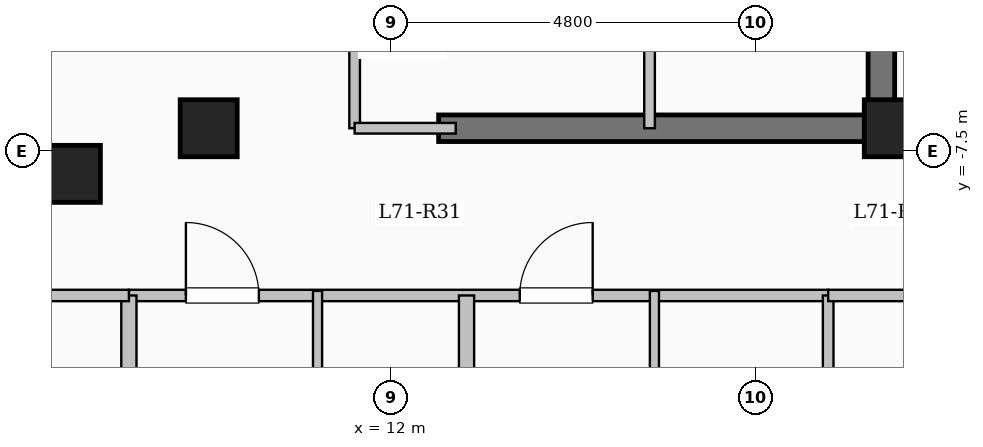
"""IFC4 building model, lengths in metres.
Left out: names, types, materials, properties, quantities, classifications, styles, units other than length and angle.
Written with IfcOpenShell. Run it as: python <this file> out.ifc"""

import sys

from ifc_helpers import new_model, si_unit, direction, frame, frame_2d, origin, origin_2d, place, context, subcontext, project, spatial, rectangle, extrude, element, fill, save


model = new_model("IFC4")
c1 = context("Model", 3, precision=1e-05, world=origin(), true_north=direction((0.0, 1.0)))
c2 = subcontext(c1, "Body", "Model", "MODEL_VIEW")
j1 = project(units=[si_unit("LENGTHUNIT", "METRE"), si_unit("PLANEANGLEUNIT", "RADIAN")], contexts=[c1])
p1 = place(None, origin())
s1 = spatial("IfcSite", under=j1, at=p1, CompositionType="ELEMENT")
p2 = place(p1, origin())
s2 = spatial("IfcBuilding", under=s1, at=p2, CompositionType="ELEMENT")
p3 = place(p2, frame((0.0, 0.0, 261.6)))
s3 = spatial("IfcBuildingStorey", under=s2, at=p3, CompositionType="ELEMENT", Elevation=261.6)
for number, where, z_axis, x_axis in (
    (1, (7.8, -7.8, 0.0), (0.0, 0.0, 1.0), (1.0, 0.0, 0.0)),
    (2, (9.6, -7.2, 0.0), (0.0, 0.0, 1.0), (1.0, 0.0, 0.0)),
    (3, (18.6, -7.2, 0.0), (0.0, 0.0, 1.0), (1.0, 0.0, 0.0)),
):
    element("IfcColumn", number, at=place(p3, frame(where, z_axis=z_axis, x_axis=x_axis)), inside=s3, PredefinedType="COLUMN", context=c2, shape_type="SweptSolid", body=[
        extrude(rectangle(XDim=0.75, YDim=0.75, at=origin_2d()), origin(), (0.0, 0.0, 1.0), 3.35),
    ])
p4 = place(p3, frame((18.45, -7.375, 0.0), z_axis=(0.0, 0.0, 1.0), x_axis=(0.0, 1.0, 0.0)))
e4 = element("IfcWall", 4, at=p4, inside=s3, PredefinedType="SHEAR", context=c2, shape_type="SweptSolid", body=[
    extrude(rectangle(XDim=14.05, YDim=0.35, at=frame_2d((7.025, 0.0))), origin(), (0.0, 0.0, 1.0), 3.35),
])
p5 = place(p3, frame((12.625, -7.2, 0.0), z_axis=(0.0, 0.0, 1.0), x_axis=(1.0, 0.0, 0.0)))
e5 = element("IfcWall", 5, at=p5, inside=s3, PredefinedType="SHEAR", context=c2, shape_type="SweptSolid", body=[
    extrude(rectangle(XDim=6.0, YDim=0.35, at=frame_2d((3.0, 0.0))), origin(), (0.0, 0.0, 1.0), 3.35),
])
p6 = place(p3, frame((15.4, -7.2, 0.0), z_axis=(0.0, 0.0, 1.0), x_axis=(0.0, 1.0, 0.0)))
e6 = element("IfcWall", 6, at=p6, inside=s3, PredefinedType="PARTITIONING", context=c2, shape_type="SweptSolid", body=[
    extrude(rectangle(XDim=10.45, YDim=0.14, at=frame_2d((5.225, 0.0))), origin(), (0.0, 0.0, 1.0), 3.1),
])
p7 = place(p6, frame((9.25, 0.0, 0.0)))
e7 = element("IfcOpeningElement", 7, at=p7, cuts=e6, PredefinedType="OPENING", context=c2, shape_type="SweptSolid", body=[
    extrude(rectangle(XDim=0.9, YDim=2.08, at=frame_2d((0.45, 1.04))), frame((0.0, 0.08, 0.0), z_axis=(0.0, -1.0, 0.0), x_axis=(1.0, 0.0, 0.0)), (0.0, 0.0, 1.0), 0.16),
])
p8 = place(p3, frame((11.52, -7.2, 0.0), z_axis=(0.0, 0.0, 1.0), x_axis=(0.0, 1.0, 0.0)))
e8 = element("IfcWall", 8, at=p8, inside=s3, PredefinedType="PARTITIONING", context=c2, shape_type="SweptSolid", body=[
    extrude(rectangle(XDim=9.12, YDim=0.14, at=frame_2d((4.56, 0.0))), origin(), (0.0, 0.0, 1.0), 3.1),
])
p9 = place(p8, frame((1.8, 0.0, 0.0)))
e9 = element("IfcOpeningElement", 9, at=p9, cuts=e8, PredefinedType="OPENING", context=c2, shape_type="SweptSolid", body=[
    extrude(rectangle(XDim=0.9, YDim=2.08, at=frame_2d((0.45, 1.04))), frame((0.0, 0.08, 0.0), z_axis=(0.0, -1.0, 0.0), x_axis=(1.0, 0.0, 0.0)), (0.0, 0.0, 1.0), 0.16),
])
p10 = place(p8, frame((6.2, 0.0, 0.0)))
e10 = element("IfcOpeningElement", 10, at=p10, cuts=e8, PredefinedType="OPENING", context=c2, shape_type="SweptSolid", body=[
    extrude(rectangle(XDim=0.9, YDim=2.08, at=frame_2d((0.45, 1.04))), frame((0.0, 0.08, 0.0), z_axis=(0.0, -1.0, 0.0), x_axis=(1.0, 0.0, 0.0)), (0.0, 0.0, 1.0), 0.16),
])
p11 = place(p3, frame((11.52, -7.2, 0.0), z_axis=(0.0, 0.0, 1.0), x_axis=(1.0, 0.0, 0.0)))
e11 = element("IfcWall", 11, at=p11, inside=s3, PredefinedType="PARTITIONING", context=c2, shape_type="SweptSolid", body=[
    extrude(rectangle(XDim=1.33, YDim=0.14, at=frame_2d((0.665, 0.0))), origin(), (0.0, 0.0, 1.0), 2.235),
])
p12 = place(p3, frame((8.55, -9.4, 0.0), z_axis=(0.0, 0.0, 1.0), x_axis=(1.0, 0.0, 0.0)))
e12 = element("IfcWall", 12, at=p12, inside=s3, PredefinedType="PARTITIONING", context=c2, shape_type="SweptSolid", body=[
    extrude(rectangle(XDim=9.2, YDim=0.15, at=frame_2d((4.6, 0.0))), origin(), (0.0, 0.0, 1.0), 3.1),
])
p13 = place(p12, frame((0.75, 0.0, 0.0)))
e13 = element("IfcOpeningElement", 13, at=p13, cuts=e12, PredefinedType="OPENING", context=c2, shape_type="SweptSolid", body=[
    extrude(rectangle(XDim=0.96, YDim=2.15, at=frame_2d((0.48, 1.075))), frame((0.0, 0.085, 0.0), z_axis=(0.0, -1.0, 0.0), x_axis=(1.0, 0.0, 0.0)), (0.0, 0.0, 1.0), 0.17),
])
p14 = place(p12, frame((5.142, 0.0, 0.0)))
e14 = element("IfcOpeningElement", 14, at=p14, cuts=e12, PredefinedType="OPENING", context=c2, shape_type="SweptSolid", body=[
    extrude(rectangle(XDim=0.96, YDim=2.15, at=frame_2d((0.48, 1.075))), frame((0.0, 0.085, 0.0), z_axis=(0.0, -1.0, 0.0), x_axis=(1.0, 0.0, 0.0)), (0.0, 0.0, 1.0), 0.17),
])
p15 = place(p3, frame((12.992, -20.9, 0.0), z_axis=(0.0, 0.0, 1.0), x_axis=(0.0, 1.0, 0.0)))
e15 = element("IfcWall", 15, at=p15, inside=s3, PredefinedType="SOLIDWALL", context=c2, shape_type="SweptSolid", body=[
    extrude(rectangle(XDim=11.5, YDim=0.2, at=frame_2d((5.75, 0.0))), origin(), (0.0, 0.0, 1.0), 3.1),
])
p16 = place(p3, frame((11.032, -12.56, 0.0), z_axis=(0.0, 0.0, 1.0), x_axis=(0.0, 1.0, 0.0)))
e16 = element("IfcWall", 16, at=p16, inside=s3, PredefinedType="PARTITIONING", context=c2, shape_type="SweptSolid", body=[
    extrude(rectangle(XDim=3.22, YDim=0.12, at=frame_2d((1.61, 0.0))), origin(), (0.0, 0.0, 1.0), 3.1),
])
p17 = place(p16, frame((1.14, 0.0, 0.0)))
e17 = element("IfcOpeningElement", 17, at=p17, cuts=e16, PredefinedType="OPENING", context=c2, shape_type="SweptSolid", body=[
    extrude(rectangle(XDim=0.88, YDim=2.1, at=frame_2d((0.44, 1.05))), frame((0.0, 0.07, 0.0), z_axis=(0.0, -1.0, 0.0), x_axis=(1.0, 0.0, 0.0)), (0.0, 0.0, 1.0), 0.14),
])
p18 = place(p3, frame((15.464, -12.56, 0.0), z_axis=(0.0, 0.0, 1.0), x_axis=(0.0, 1.0, 0.0)))
e18 = element("IfcWall", 18, at=p18, inside=s3, PredefinedType="PARTITIONING", context=c2, shape_type="SweptSolid", body=[
    extrude(rectangle(XDim=3.22, YDim=0.12, at=frame_2d((1.61, 0.0))), origin(), (0.0, 0.0, 1.0), 3.1),
])
p19 = place(p18, frame((1.14, 0.0, 0.0)))
e19 = element("IfcOpeningElement", 19, at=p19, cuts=e18, PredefinedType="OPENING", context=c2, shape_type="SweptSolid", body=[
    extrude(rectangle(XDim=0.88, YDim=2.1, at=frame_2d((0.44, 1.05))), frame((0.0, 0.07, 0.0), z_axis=(0.0, -1.0, 0.0), x_axis=(1.0, 0.0, 0.0)), (0.0, 0.0, 1.0), 0.14),
])
p20 = place(p3, frame((8.55, -21.504, 0.0), z_axis=(0.0, 0.0, 1.0), x_axis=(0.0, 1.0, 0.0)))
e20 = element("IfcWall", 20, at=p20, inside=s3, PredefinedType="SOLIDWALL", context=c2, shape_type="SweptSolid", body=[
    extrude(rectangle(XDim=12.104, YDim=0.2, at=frame_2d((6.052, 0.0))), origin(), (0.0, 0.0, 1.0), 3.1),
])
p21 = place(p3, frame((-8.55, -9.4, 0.0), z_axis=(0.0, 0.0, 1.0), x_axis=(1.0, 0.0, 0.0)))
e21 = element("IfcWall", 21, at=p21, inside=s3, PredefinedType="PARTITIONING", context=c2, shape_type="SweptSolid", body=[
    extrude(rectangle(XDim=17.1, YDim=0.15, at=frame_2d((8.55, 0.0))), origin(), (0.0, 0.0, 1.0), 3.1),
])
p22 = place(p21, frame((1.75, 0.0, 0.0)))
e22 = element("IfcOpeningElement", 22, at=p22, cuts=e21, PredefinedType="OPENING", context=c2, shape_type="SweptSolid", body=[
    extrude(rectangle(XDim=0.96, YDim=2.15, at=frame_2d((0.48, 1.075))), frame((0.0, 0.085, 0.0), z_axis=(0.0, -1.0, 0.0), x_axis=(1.0, 0.0, 0.0)), (0.0, 0.0, 1.0), 0.17),
])
p23 = place(p3, frame((18.45, -7.25, 0.0), z_axis=(0.0, 0.0, 1.0), x_axis=(1.0, 0.0, 0.0)))
e23 = element("IfcWall", 23, at=p23, inside=s3, PredefinedType="PARTITIONING", context=c2, shape_type="SweptSolid", body=[
    extrude(rectangle(XDim=4.23, YDim=0.15, at=frame_2d((2.115, 0.0))), origin(), (0.0, 0.0, 1.0), 3.1),
])
p24 = place(p23, frame((1.5, 0.0, 0.0)))
e24 = element("IfcOpeningElement", 24, at=p24, cuts=e23, PredefinedType="OPENING", context=c2, shape_type="SweptSolid", body=[
    extrude(rectangle(XDim=1.08, YDim=2.15, at=frame_2d((0.54, 1.075))), frame((0.0, 0.085, 0.0), z_axis=(0.0, -1.0, 0.0), x_axis=(1.0, 0.0, 0.0)), (0.0, 0.0, 1.0), 0.17),
])
p25 = place(p3, frame((17.75, -17.55, 0.0), z_axis=(0.0, 0.0, 1.0), x_axis=(0.0, 1.0, 0.0)))
e25 = element("IfcWall", 25, at=p25, inside=s3, PredefinedType="PARTITIONING", context=c2, shape_type="SweptSolid", body=[
    extrude(rectangle(XDim=8.15, YDim=0.14, at=frame_2d((4.075, 0.0))), origin(), (0.0, 0.0, 1.0), 3.1),
])
p26 = place(p3, frame((17.75, -9.4, 0.0), z_axis=(0.0, 0.0, 1.0), x_axis=(1.0, 0.0, 0.0)))
e26 = element("IfcWall", 26, at=p26, inside=s3, PredefinedType="PARTITIONING", context=c2, shape_type="SweptSolid", body=[
    extrude(rectangle(XDim=4.93, YDim=0.15, at=frame_2d((2.465, 0.0))), origin(), (0.0, 0.0, 1.0), 3.1),
])
p27 = place(p26, frame((1.99, 0.0, 0.0)))
e27 = element("IfcOpeningElement", 27, at=p27, cuts=e26, PredefinedType="OPENING", context=c2, shape_type="SweptSolid", body=[
    extrude(rectangle(XDim=0.95, YDim=2.15, at=frame_2d((0.475, 1.075))), frame((0.0, 0.085, 0.0), z_axis=(0.0, -1.0, 0.0), x_axis=(1.0, 0.0, 0.0)), (0.0, 0.0, 1.0), 0.17),
])
p28 = place(p13, origin())
e28 = element("IfcDoor", 28, at=p28, inside=s3, OperationType="SINGLE_SWING_LEFT", PredefinedType="DOOR", context=c2, shape_type="SweptSolid", body=[
    extrude(rectangle(XDim=0.96, YDim=2.15, at=frame_2d((0.48, 1.075))), frame((0.0, 0.025, 0.0), z_axis=(0.0, -1.0, 0.0), x_axis=(1.0, 0.0, 0.0)), (0.0, 0.0, 1.0), 0.05),
])
fill(e13, e28)
p29 = place(p14, origin())
e29 = element("IfcDoor", 29, at=p29, inside=s3, OperationType="SINGLE_SWING_RIGHT", PredefinedType="DOOR", context=c2, shape_type="SweptSolid", body=[
    extrude(rectangle(XDim=0.96, YDim=2.15, at=frame_2d((0.48, 1.075))), frame((0.0, 0.025, 0.0), z_axis=(0.0, -1.0, 0.0), x_axis=(1.0, 0.0, 0.0)), (0.0, 0.0, 1.0), 0.05),
])
fill(e14, e29)
save(model, sys.argv[1])
